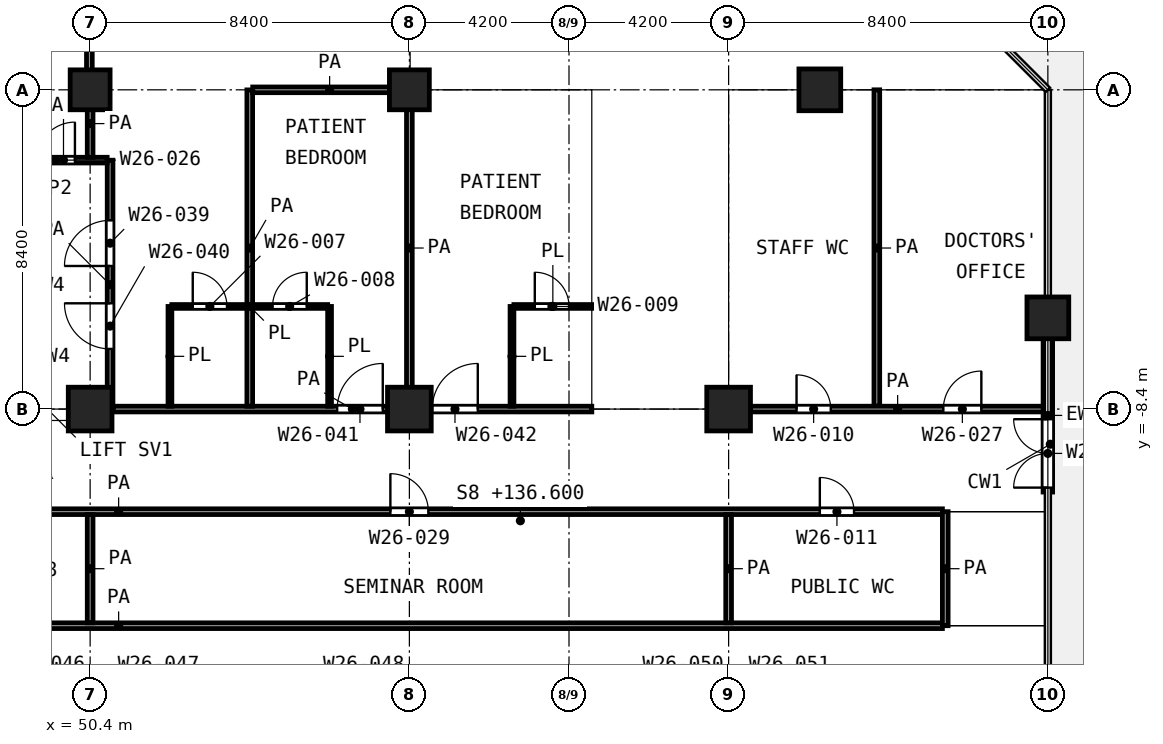
"""IFC4 building model, lengths in metres.
Left out: names, types, materials, properties, quantities, classifications, styles, units other than length and angle.
Written with IfcOpenShell. Run it as: python <this file> out.ifc"""

import sys

from ifc_helpers import new_model, si_unit, direction, frame, frame_2d, origin, origin_2d, place, context, subcontext, project, spatial, rectangle, extrude, element, fill, save


model = new_model("IFC4")
c1 = context("Model", 3, precision=1e-05, world=origin(), true_north=direction((0.0, 1.0)))
c2 = subcontext(c1, "Body", "Model", "MODEL_VIEW")
j1 = project(units=[si_unit("LENGTHUNIT", "METRE"), si_unit("PLANEANGLEUNIT", "RADIAN")], contexts=[c1])
p1 = place(None, origin())
s1 = spatial("IfcSite", under=j1, at=p1, CompositionType="ELEMENT")
p2 = place(p1, origin())
s2 = spatial("IfcBuilding", under=s1, at=p2, CompositionType="ELEMENT")
p3 = place(p2, frame((0.0, 0.0, 136.6)))
s3 = spatial("IfcBuildingStorey", under=s2, at=p3, CompositionType="ELEMENT", Elevation=136.6)
for number, where, z_axis, x_axis in (
    (1, (50.4, 0.0, 0.0), (0.0, 0.0, 1.0), (1.0, 0.0, 0.0)),
    (2, (58.8, 0.0, 0.0), (0.0, 0.0, 1.0), (1.0, 0.0, 0.0)),
):
    element("IfcColumn", number, at=place(p3, frame(where, z_axis=z_axis, x_axis=x_axis)), inside=s3, PredefinedType="COLUMN", context=c2, shape_type="SweptSolid", body=[
        extrude(rectangle(XDim=1.05, YDim=1.05, at=origin_2d()), origin(), (0.0, 0.0, 1.0), 4.2),
    ])
for number, where, z_axis, x_axis in (
    (3, (69.6, 0.0, 0.0), (0.0, 0.0, 1.0), (1.0, 0.0, 0.0)),
    (4, (75.6, -6.0, 0.0), (0.0, 0.0, 1.0), (1.0, 0.0, 0.0)),
):
    element("IfcColumn", number, at=place(p3, frame(where, z_axis=z_axis, x_axis=x_axis)), inside=s3, PredefinedType="COLUMN", context=c2, shape_type="SweptSolid", body=[
        extrude(rectangle(XDim=1.1, YDim=1.1, at=origin_2d()), origin(), (0.0, 0.0, 1.0), 4.2),
    ])
for number, where, z_axis, x_axis in (
    (5, (50.4, -8.4, 0.0), (0.0, 0.0, 1.0), (1.0, 0.0, 0.0)),
    (6, (58.8, -8.4, 0.0), (0.0, 0.0, 1.0), (1.0, 0.0, 0.0)),
    (7, (67.2, -8.4, 0.0), (0.0, 0.0, 1.0), (1.0, 0.0, 0.0)),
):
    element("IfcColumn", number, at=place(p3, frame(where, z_axis=z_axis, x_axis=x_axis)), inside=s3, PredefinedType="COLUMN", context=c2, shape_type="SweptSolid", body=[
        extrude(rectangle(XDim=1.15, YDim=1.15, at=origin_2d()), origin(), (0.0, 0.0, 1.0), 4.2),
    ])
p4 = place(p3, frame((75.6, -10.583, 0.0), z_axis=(0.0, 0.0, 1.0), x_axis=(0.0, 1.0, 0.0)))
e8 = element("IfcWall", 8, at=p4, inside=s3, PredefinedType="SOLIDWALL", context=c2, shape_type="SweptSolid", body=[
    extrude(rectangle(XDim=4.033, YDim=0.25, at=frame_2d((2.017, 0.0))), origin(), (0.0, 0.0, 1.0), 3.48),
])
p5 = place(p4, frame((0.117, 0.0, 0.0)))
e9 = element("IfcOpeningElement", 9, at=p5, cuts=e8, PredefinedType="OPENING", context=c2, shape_type="SweptSolid", body=[
    extrude(rectangle(XDim=1.8, YDim=2.1, at=frame_2d((0.9, 1.05))), frame((0.0, 0.135, 0.0), z_axis=(0.0, -1.0, 0.0), x_axis=(1.0, 0.0, 0.0)), (0.0, 0.0, 1.0), 0.27),
])
p6 = place(p3, frame((52.55, -5.7, 0.0), z_axis=(0.0, 0.0, 1.0), x_axis=(1.0, 0.0, 0.0)))
e10 = element("IfcWall", 10, at=p6, inside=s3, PredefinedType="PARTITIONING", context=c2, shape_type="SweptSolid", body=[
    extrude(rectangle(XDim=4.1, YDim=0.1, at=frame_2d((2.05, 0.0))), origin(), (0.0, 0.0, 1.0), 3.6),
])
p7 = place(p6, frame((0.55, 0.0, 0.0)))
e11 = element("IfcOpeningElement", 11, at=p7, cuts=e10, PredefinedType="OPENING", context=c2, shape_type="SweptSolid", body=[
    extrude(rectangle(XDim=0.9, YDim=2.1, at=frame_2d((0.45, 1.05))), frame((0.0, 0.06, 0.0), z_axis=(0.0, -1.0, 0.0), x_axis=(1.0, 0.0, 0.0)), (0.0, 0.0, 1.0), 0.12),
])
p8 = place(p6, frame((2.65, 0.0, 0.0)))
e12 = element("IfcOpeningElement", 12, at=p8, cuts=e10, PredefinedType="OPENING", context=c2, shape_type="SweptSolid", body=[
    extrude(rectangle(XDim=0.9, YDim=2.1, at=frame_2d((0.45, 1.05))), frame((0.0, 0.06, 0.0), z_axis=(0.0, -1.0, 0.0), x_axis=(1.0, 0.0, 0.0)), (0.0, 0.0, 1.0), 0.12),
])
p9 = place(p3, frame((61.55, -5.7, 0.0), z_axis=(0.0, 0.0, 1.0), x_axis=(1.0, 0.0, 0.0)))
e13 = element("IfcWall", 13, at=p9, inside=s3, PredefinedType="PARTITIONING", context=c2, shape_type="SweptSolid", body=[
    extrude(rectangle(XDim=2.05, YDim=0.1, at=frame_2d((1.025, 0.0))), origin(), (0.0, 0.0, 1.0), 3.6),
])
p10 = place(p9, frame((0.55, 0.0, 0.0)))
e14 = element("IfcOpeningElement", 14, at=p10, cuts=e13, PredefinedType="OPENING", context=c2, shape_type="SweptSolid", body=[
    extrude(rectangle(XDim=0.9, YDim=2.1, at=frame_2d((0.45, 1.05))), frame((0.0, 0.06, 0.0), z_axis=(0.0, -1.0, 0.0), x_axis=(1.0, 0.0, 0.0)), (0.0, 0.0, 1.0), 0.12),
])
for number, where, z_axis, x_axis in (
    (15, (52.5, -8.325, 0.0), (0.0, 0.0, 1.0), (0.0, 1.0, 0.0)),
    (16, (56.7, -8.325, 0.0), (0.0, 0.0, 1.0), (0.0, 1.0, 0.0)),
    (17, (61.5, -8.325, 0.0), (0.0, 0.0, 1.0), (0.0, 1.0, 0.0)),
):
    element("IfcWall", number, at=place(p3, frame(where, z_axis=z_axis, x_axis=x_axis)), inside=s3, PredefinedType="PARTITIONING", context=c2, shape_type="SweptSolid", body=[
        extrude(rectangle(XDim=2.625, YDim=0.1, at=frame_2d((1.312, 0.0))), origin(), (0.0, 0.0, 1.0), 3.6),
    ])
p11 = place(p3, frame((29.475, -14.1, 0.0), z_axis=(0.0, 0.0, 1.0), x_axis=(1.0, 0.0, 0.0)))
e18 = element("IfcWall", 18, at=p11, inside=s3, PredefinedType="PARTITIONING", context=c2, shape_type="SweptSolid", body=[
    extrude(rectangle(XDim=43.35, YDim=0.15, at=frame_2d((21.675, 0.0))), origin(), (0.0, 0.0, 1.0), 3.6),
])
p12 = place(p11, frame((18.475, 0.0, 0.0)))
e19 = element("IfcOpeningElement", 19, at=p12, cuts=e18, PredefinedType="OPENING", context=c2, shape_type="SweptSolid", body=[
    extrude(rectangle(XDim=1.0, YDim=2.1, at=frame_2d((0.5, 1.05))), frame((0.0, 0.085, 0.0), z_axis=(0.0, -1.0, 0.0), x_axis=(1.0, 0.0, 0.0)), (0.0, 0.0, 1.0), 0.17),
])
p13 = place(p3, frame((29.475, -11.1, 0.0), z_axis=(0.0, 0.0, 1.0), x_axis=(1.0, 0.0, 0.0)))
e20 = element("IfcWall", 20, at=p13, inside=s3, PredefinedType="PARTITIONING", context=c2, shape_type="SweptSolid", body=[
    extrude(rectangle(XDim=43.35, YDim=0.15, at=frame_2d((21.675, 0.0))), origin(), (0.0, 0.0, 1.0), 3.6),
])
p14 = place(p13, frame((28.825, 0.0, 0.0)))
e21 = element("IfcOpeningElement", 21, at=p14, cuts=e20, PredefinedType="OPENING", context=c2, shape_type="SweptSolid", body=[
    extrude(rectangle(XDim=1.0, YDim=2.1, at=frame_2d((0.5, 1.05))), frame((0.0, 0.085, 0.0), z_axis=(0.0, -1.0, 0.0), x_axis=(1.0, 0.0, 0.0)), (0.0, 0.0, 1.0), 0.17),
])
p15 = place(p13, frame((40.125, 0.0, 0.0)))
e22 = element("IfcOpeningElement", 22, at=p15, cuts=e20, PredefinedType="OPENING", context=c2, shape_type="SweptSolid", body=[
    extrude(rectangle(XDim=0.9, YDim=2.1, at=frame_2d((0.45, 1.05))), frame((0.0, 0.085, 0.0), z_axis=(0.0, -1.0, 0.0), x_axis=(1.0, 0.0, 0.0)), (0.0, 0.0, 1.0), 0.17),
])
p16 = place(p13, frame((5.025, 0.0, 0.0)))
e23 = element("IfcOpeningElement", 23, at=p16, cuts=e20, PredefinedType="OPENING", context=c2, shape_type="SweptSolid", body=[
    extrude(rectangle(XDim=1.0, YDim=2.1, at=frame_2d((0.5, 1.05))), frame((0.0, 0.085, 0.0), z_axis=(0.0, -1.0, 0.0), x_axis=(1.0, 0.0, 0.0)), (0.0, 0.0, 1.0), 0.17),
])
p17 = place(p13, frame((12.525, 0.0, 0.0)))
e24 = element("IfcOpeningElement", 24, at=p17, cuts=e20, PredefinedType="OPENING", context=c2, shape_type="SweptSolid", body=[
    extrude(rectangle(XDim=1.0, YDim=2.1, at=frame_2d((0.5, 1.05))), frame((0.0, 0.085, 0.0), z_axis=(0.0, -1.0, 0.0), x_axis=(1.0, 0.0, 0.0)), (0.0, 0.0, 1.0), 0.17),
])
p18 = place(p3, frame((51.0, -8.4, 0.0), z_axis=(0.0, 0.0, 1.0), x_axis=(1.0, 0.0, 0.0)))
e25 = element("IfcWall", 25, at=p18, inside=s3, PredefinedType="PARTITIONING", context=c2, shape_type="SweptSolid", body=[
    extrude(rectangle(XDim=12.6, YDim=0.15, at=frame_2d((6.3, 0.0))), origin(), (0.0, 0.0, 1.0), 3.6),
])
p19 = place(p18, frame((5.9, 0.0, 0.0)))
e26 = element("IfcOpeningElement", 26, at=p19, cuts=e25, PredefinedType="OPENING", context=c2, shape_type="SweptSolid", body=[
    extrude(rectangle(XDim=1.2, YDim=2.1, at=frame_2d((0.6, 1.05))), frame((0.0, 0.085, 0.0), z_axis=(0.0, -1.0, 0.0), x_axis=(1.0, 0.0, 0.0)), (0.0, 0.0, 1.0), 0.17),
])
p20 = place(p18, frame((8.4, 0.0, 0.0)))
e27 = element("IfcOpeningElement", 27, at=p20, cuts=e25, PredefinedType="OPENING", context=c2, shape_type="SweptSolid", body=[
    extrude(rectangle(XDim=1.2, YDim=2.1, at=frame_2d((0.6, 1.05))), frame((0.0, 0.085, 0.0), z_axis=(0.0, -1.0, 0.0), x_axis=(1.0, 0.0, 0.0)), (0.0, 0.0, 1.0), 0.17),
])
p21 = place(p3, frame((67.775, -8.4, 0.0), z_axis=(0.0, 0.0, 1.0), x_axis=(1.0, 0.0, 0.0)))
e28 = element("IfcWall", 28, at=p21, inside=s3, PredefinedType="PARTITIONING", context=c2, shape_type="SweptSolid", body=[
    extrude(rectangle(XDim=7.745, YDim=0.15, at=frame_2d((3.873, 0.0))), origin(), (0.0, 0.0, 1.0), 3.6),
])
p22 = place(p21, frame((1.212, 0.0, 0.0)))
e29 = element("IfcOpeningElement", 29, at=p22, cuts=e28, PredefinedType="OPENING", context=c2, shape_type="SweptSolid", body=[
    extrude(rectangle(XDim=0.9, YDim=2.1, at=frame_2d((0.45, 1.05))), frame((0.0, 0.085, 0.0), z_axis=(0.0, -1.0, 0.0), x_axis=(1.0, 0.0, 0.0)), (0.0, 0.0, 1.0), 0.17),
])
p23 = place(p21, frame((5.075, 0.0, 0.0)))
e30 = element("IfcOpeningElement", 30, at=p23, cuts=e28, PredefinedType="OPENING", context=c2, shape_type="SweptSolid", body=[
    extrude(rectangle(XDim=1.0, YDim=2.1, at=frame_2d((0.5, 1.05))), frame((0.0, 0.085, 0.0), z_axis=(0.0, -1.0, 0.0), x_axis=(1.0, 0.0, 0.0)), (0.0, 0.0, 1.0), 0.17),
])
p24 = place(p3, frame((48.55, -1.85, 0.0), z_axis=(0.0, 0.0, 1.0), x_axis=(1.0, 0.0, 0.0)))
e31 = element("IfcWall", 31, at=p24, inside=s3, PredefinedType="PARTITIONING", context=c2, shape_type="SweptSolid", body=[
    extrude(rectangle(XDim=2.298, YDim=0.15, at=frame_2d((1.149, 0.0))), origin(), (0.0, 0.0, 1.0), 3.6),
])
p25 = place(p24, frame((0.45, 0.0, 0.0)))
e32 = element("IfcOpeningElement", 32, at=p25, cuts=e31, PredefinedType="OPENING", context=c2, shape_type="SweptSolid", body=[
    extrude(rectangle(XDim=1.0, YDim=2.1, at=frame_2d((0.5, 1.05))), frame((0.0, 0.085, 0.0), z_axis=(0.0, -1.0, 0.0), x_axis=(1.0, 0.0, 0.0)), (0.0, 0.0, 1.0), 0.17),
])
p26 = place(p3, frame((54.678, 0.0, 0.0), z_axis=(0.0, 0.0, 1.0), x_axis=(1.0, 0.0, 0.0)))
e33 = element("IfcWall", 33, at=p26, inside=s3, PredefinedType="PARTITIONING", context=c2, shape_type="SweptSolid", body=[
    extrude(rectangle(XDim=4.047, YDim=0.15, at=frame_2d((2.023, 0.0))), origin(), (0.0, 0.0, 1.0), 3.6),
])
p27 = place(p3, frame((50.38, 0.02, 0.0), z_axis=(0.0, 0.0, 1.0), x_axis=(0.0, 1.0, 0.0)))
e34 = element("IfcWall", 34, at=p27, inside=s3, PredefinedType="PARTITIONING", context=c2, shape_type="SweptSolid", body=[
    extrude(rectangle(XDim=5.9, YDim=0.15, at=frame_2d((2.95, 0.0))), origin(), (0.0, 0.0, 1.0), 3.6),
])
p28 = place(p3, frame((50.4, -14.025, 0.0), z_axis=(0.0, 0.0, 1.0), x_axis=(0.0, 1.0, 0.0)))
e35 = element("IfcWall", 35, at=p28, inside=s3, PredefinedType="PARTITIONING", context=c2, shape_type="SweptSolid", body=[
    extrude(rectangle(XDim=2.85, YDim=0.15, at=frame_2d((1.425, 0.0))), origin(), (0.0, 0.0, 1.0), 3.6),
])
p29 = place(p3, frame((50.4, -1.775, 0.0), z_axis=(0.0, 0.0, 1.0), x_axis=(0.0, 1.0, 0.0)))
e36 = element("IfcWall", 36, at=p29, inside=s3, PredefinedType="PARTITIONING", context=c2, shape_type="SweptSolid", body=[
    extrude(rectangle(XDim=1.773, YDim=0.15, at=frame_2d((0.886, 0.0))), origin(), (0.0, 0.0, 1.0), 3.6),
])
p30 = place(p3, frame((50.925, -8.4, 0.0), z_axis=(0.0, 0.0, 1.0), x_axis=(0.0, 1.0, 0.0)))
e37 = element("IfcWall", 37, at=p30, inside=s3, PredefinedType="PARTITIONING", context=c2, shape_type="SweptSolid", body=[
    extrude(rectangle(XDim=6.548, YDim=0.15, at=frame_2d((3.274, 0.0))), origin(), (0.0, 0.0, 1.0), 3.6),
])
p31 = place(p30, frame((3.765, 0.0, 0.0)))
e38 = element("IfcOpeningElement", 38, at=p31, cuts=e37, PredefinedType="OPENING", context=c2, shape_type="SweptSolid", body=[
    extrude(rectangle(XDim=1.2, YDim=2.1, at=frame_2d((0.6, 1.05))), frame((0.0, 0.085, 0.0), z_axis=(0.0, -1.0, 0.0), x_axis=(1.0, 0.0, 0.0)), (0.0, 0.0, 1.0), 0.17),
])
p32 = place(p30, frame((1.583, 0.0, 0.0)))
e39 = element("IfcOpeningElement", 39, at=p32, cuts=e37, PredefinedType="OPENING", context=c2, shape_type="SweptSolid", body=[
    extrude(rectangle(XDim=1.2, YDim=2.1, at=frame_2d((0.6, 1.05))), frame((0.0, 0.085, 0.0), z_axis=(0.0, -1.0, 0.0), x_axis=(1.0, 0.0, 0.0)), (0.0, 0.0, 1.0), 0.17),
])
p33 = place(p3, frame((54.6, -8.325, 0.0), z_axis=(0.0, 0.0, 1.0), x_axis=(0.0, 1.0, 0.0)))
e40 = element("IfcWall", 40, at=p33, inside=s3, PredefinedType="PARTITIONING", context=c2, shape_type="SweptSolid", body=[
    extrude(rectangle(XDim=8.323, YDim=0.15, at=frame_2d((4.162, 0.0))), origin(), (0.0, 0.0, 1.0), 3.6),
])
p34 = place(p3, frame((58.8, -8.325, 0.0), z_axis=(0.0, 0.0, 1.0), x_axis=(0.0, 1.0, 0.0)))
e41 = element("IfcWall", 41, at=p34, inside=s3, PredefinedType="PARTITIONING", context=c2, shape_type="SweptSolid", body=[
    extrude(rectangle(XDim=8.325, YDim=0.15, at=frame_2d((4.163, 0.0))), origin(), (0.0, 0.0, 1.0), 3.6),
])
p35 = place(p3, frame((67.2, -14.025, 0.0), z_axis=(0.0, 0.0, 1.0), x_axis=(0.0, 1.0, 0.0)))
e42 = element("IfcWall", 42, at=p35, inside=s3, PredefinedType="PARTITIONING", context=c2, shape_type="SweptSolid", body=[
    extrude(rectangle(XDim=2.85, YDim=0.15, at=frame_2d((1.425, 0.0))), origin(), (0.0, 0.0, 1.0), 3.6),
])
p36 = place(p3, frame((71.1, -8.325, 0.0), z_axis=(0.0, 0.0, 1.0), x_axis=(0.0, 1.0, 0.0)))
e43 = element("IfcWall", 43, at=p36, inside=s3, PredefinedType="PARTITIONING", context=c2, shape_type="SweptSolid", body=[
    extrude(rectangle(XDim=8.325, YDim=0.15, at=frame_2d((4.163, 0.0))), origin(), (0.0, 0.0, 1.0), 3.6),
])
p37 = place(p3, frame((72.9, -14.1, 0.0), z_axis=(0.0, 0.0, 1.0), x_axis=(0.0, 1.0, 0.0)))
e44 = element("IfcWall", 44, at=p37, inside=s3, PredefinedType="PARTITIONING", context=c2, shape_type="SweptSolid", body=[
    extrude(rectangle(XDim=3.0, YDim=0.15, at=frame_2d((1.5, 0.0))), origin(), (0.0, 0.0, 1.0), 3.6),
])
p38 = place(p5, origin())
e45 = element("IfcDoor", 45, at=p38, inside=s3, OperationType="DOUBLE_DOOR_SINGLE_SWING", PredefinedType="DOOR", context=c2, shape_type="SweptSolid", body=[
    extrude(rectangle(XDim=1.8, YDim=2.1, at=frame_2d((0.9, 1.05))), frame((0.0, 0.025, 0.0), z_axis=(0.0, -1.0, 0.0), x_axis=(1.0, 0.0, 0.0)), (0.0, 0.0, 1.0), 0.05),
])
fill(e9, e45)
p39 = place(p25, origin())
e46 = element("IfcDoor", 46, at=p39, inside=s3, OperationType="SINGLE_SWING_RIGHT", PredefinedType="DOOR", context=c2, shape_type="SweptSolid", body=[
    extrude(rectangle(XDim=1.0, YDim=2.1, at=frame_2d((0.5, 1.05))), frame((0.0, 0.025, 0.0), z_axis=(0.0, -1.0, 0.0), x_axis=(1.0, 0.0, 0.0)), (0.0, 0.0, 1.0), 0.05),
])
fill(e32, e46)
p40 = place(p31, origin())
e47 = element("IfcDoor", 47, at=p40, inside=s3, OperationType="SINGLE_SWING_LEFT", PredefinedType="DOOR", context=c2, shape_type="SweptSolid", body=[
    extrude(rectangle(XDim=1.2, YDim=2.1, at=frame_2d((0.6, 1.05))), frame((0.0, 0.025, 0.0), z_axis=(0.0, -1.0, 0.0), x_axis=(1.0, 0.0, 0.0)), (0.0, 0.0, 1.0), 0.05),
])
fill(e38, e47)
p41 = place(p32, origin())
e48 = element("IfcDoor", 48, at=p41, inside=s3, OperationType="SINGLE_SWING_RIGHT", PredefinedType="DOOR", context=c2, shape_type="SweptSolid", body=[
    extrude(rectangle(XDim=1.2, YDim=2.1, at=frame_2d((0.6, 1.05))), frame((0.0, 0.025, 0.0), z_axis=(0.0, -1.0, 0.0), x_axis=(1.0, 0.0, 0.0)), (0.0, 0.0, 1.0), 0.05),
])
fill(e39, e48)
p42 = place(p7, origin())
e49 = element("IfcDoor", 49, at=p42, inside=s3, OperationType="SINGLE_SWING_LEFT", PredefinedType="DOOR", context=c2, shape_type="SweptSolid", body=[
    extrude(rectangle(XDim=0.9, YDim=2.1, at=frame_2d((0.45, 1.05))), frame((0.0, 0.025, 0.0), z_axis=(0.0, -1.0, 0.0), x_axis=(1.0, 0.0, 0.0)), (0.0, 0.0, 1.0), 0.05),
])
fill(e11, e49)
p43 = place(p19, origin())
e50 = element("IfcDoor", 50, at=p43, inside=s3, OperationType="SINGLE_SWING_RIGHT", PredefinedType="DOOR", context=c2, shape_type="SweptSolid", body=[
    extrude(rectangle(XDim=1.2, YDim=2.1, at=frame_2d((0.6, 1.05))), frame((0.0, 0.025, 0.0), z_axis=(0.0, -1.0, 0.0), x_axis=(1.0, 0.0, 0.0)), (0.0, 0.0, 1.0), 0.05),
])
fill(e26, e50)
p44 = place(p8, origin())
e51 = element("IfcDoor", 51, at=p44, inside=s3, OperationType="SINGLE_SWING_RIGHT", PredefinedType="DOOR", context=c2, shape_type="SweptSolid", body=[
    extrude(rectangle(XDim=0.9, YDim=2.1, at=frame_2d((0.45, 1.05))), frame((0.0, 0.025, 0.0), z_axis=(0.0, -1.0, 0.0), x_axis=(1.0, 0.0, 0.0)), (0.0, 0.0, 1.0), 0.05),
])
fill(e12, e51)
p45 = place(p20, origin())
e52 = element("IfcDoor", 52, at=p45, inside=s3, OperationType="SINGLE_SWING_RIGHT", PredefinedType="DOOR", context=c2, shape_type="SweptSolid", body=[
    extrude(rectangle(XDim=1.2, YDim=2.1, at=frame_2d((0.6, 1.05))), frame((0.0, 0.025, 0.0), z_axis=(0.0, -1.0, 0.0), x_axis=(1.0, 0.0, 0.0)), (0.0, 0.0, 1.0), 0.05),
])
fill(e27, e52)
p46 = place(p10, origin())
e53 = element("IfcDoor", 53, at=p46, inside=s3, OperationType="SINGLE_SWING_LEFT", PredefinedType="DOOR", context=c2, shape_type="SweptSolid", body=[
    extrude(rectangle(XDim=0.9, YDim=2.1, at=frame_2d((0.45, 1.05))), frame((0.0, 0.025, 0.0), z_axis=(0.0, -1.0, 0.0), x_axis=(1.0, 0.0, 0.0)), (0.0, 0.0, 1.0), 0.05),
])
fill(e14, e53)
p47 = place(p22, origin())
e54 = element("IfcDoor", 54, at=p47, inside=s3, OperationType="SINGLE_SWING_LEFT", PredefinedType="DOOR", context=c2, shape_type="SweptSolid", body=[
    extrude(rectangle(XDim=0.9, YDim=2.1, at=frame_2d((0.45, 1.05))), frame((0.0, 0.025, 0.0), z_axis=(0.0, -1.0, 0.0), x_axis=(1.0, 0.0, 0.0)), (0.0, 0.0, 1.0), 0.05),
])
fill(e29, e54)
p48 = place(p23, origin())
e55 = element("IfcDoor", 55, at=p48, inside=s3, OperationType="SINGLE_SWING_RIGHT", PredefinedType="DOOR", context=c2, shape_type="SweptSolid", body=[
    extrude(rectangle(XDim=1.0, YDim=2.1, at=frame_2d((0.5, 1.05))), frame((0.0, 0.025, 0.0), z_axis=(0.0, -1.0, 0.0), x_axis=(1.0, 0.0, 0.0)), (0.0, 0.0, 1.0), 0.05),
])
fill(e30, e55)
p49 = place(p14, origin())
e56 = element("IfcDoor", 56, at=p49, inside=s3, OperationType="SINGLE_SWING_LEFT", PredefinedType="DOOR", context=c2, shape_type="SweptSolid", body=[
    extrude(rectangle(XDim=1.0, YDim=2.1, at=frame_2d((0.5, 1.05))), frame((0.0, 0.025, 0.0), z_axis=(0.0, -1.0, 0.0), x_axis=(1.0, 0.0, 0.0)), (0.0, 0.0, 1.0), 0.05),
])
fill(e21, e56)
p50 = place(p15, origin())
e57 = element("IfcDoor", 57, at=p50, inside=s3, OperationType="SINGLE_SWING_LEFT", PredefinedType="DOOR", context=c2, shape_type="SweptSolid", body=[
    extrude(rectangle(XDim=0.9, YDim=2.1, at=frame_2d((0.45, 1.05))), frame((0.0, 0.025, 0.0), z_axis=(0.0, -1.0, 0.0), x_axis=(1.0, 0.0, 0.0)), (0.0, 0.0, 1.0), 0.05),
])
fill(e22, e57)
save(model, sys.argv[1])
